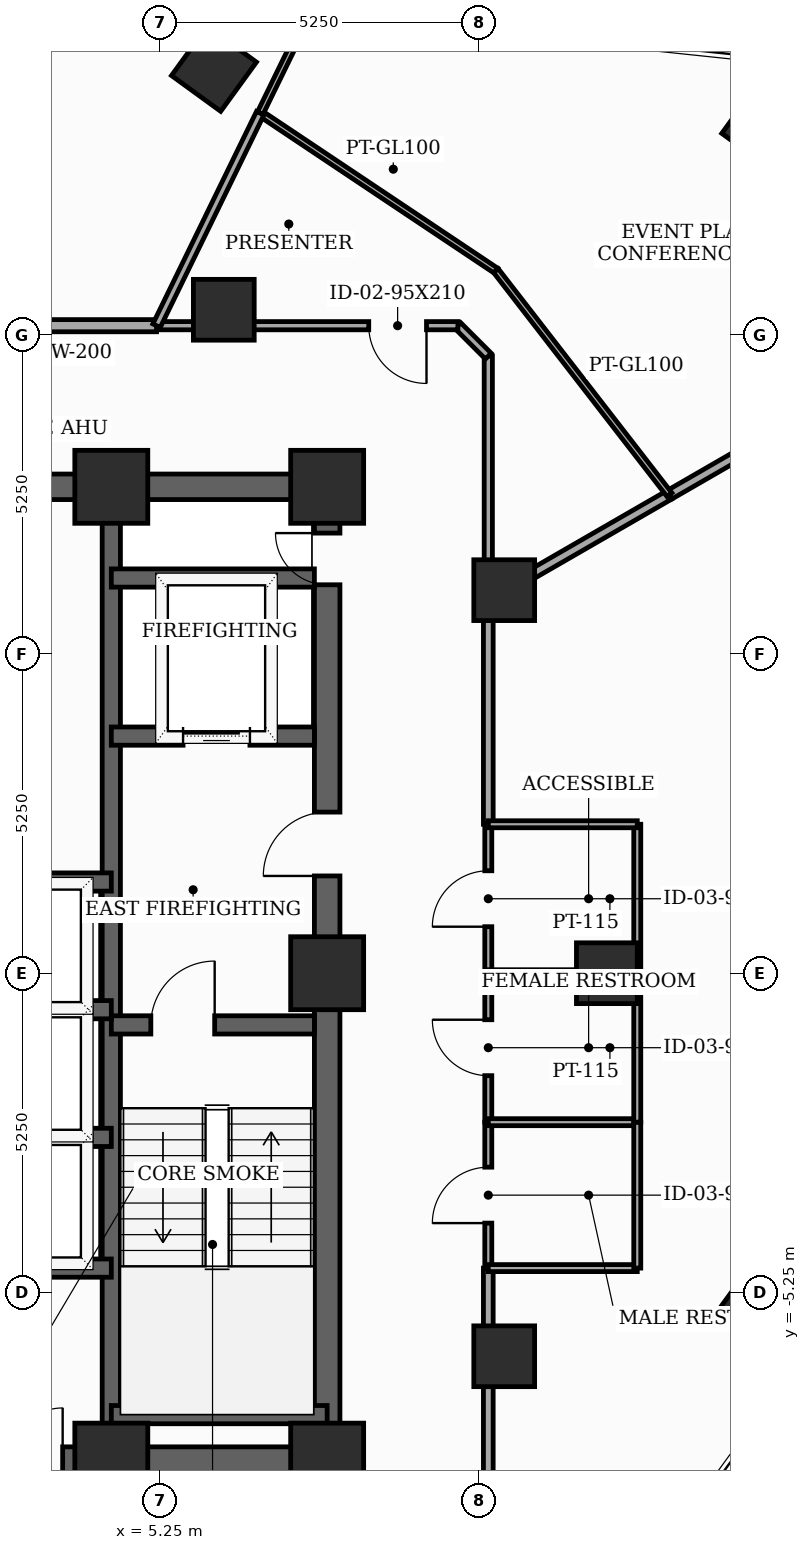
"""IFC4 building model, lengths in metres.
Left out: names, types, materials, properties, quantities, classifications, styles, units other than length and angle.
Written with IfcOpenShell. Run it as: python <this file> out.ifc"""

import sys

from ifc_helpers import new_model, si_unit, direction, frame, frame_2d, origin, origin_2d, place, context, subcontext, project, spatial, rectangle, extrude, element, fill, save


model = new_model("IFC4")
c1 = context("Model", 3, precision=1e-05, world=origin(), true_north=direction((0.0, 1.0)))
c2 = subcontext(c1, "Body", "Model", "MODEL_VIEW")
j1 = project(units=[si_unit("LENGTHUNIT", "METRE"), si_unit("PLANEANGLEUNIT", "RADIAN")], contexts=[c1])
p1 = place(None, origin())
s1 = spatial("IfcSite", under=j1, at=p1, CompositionType="ELEMENT")
p2 = place(p1, origin())
s2 = spatial("IfcBuilding", under=s1, at=p2, CompositionType="ELEMENT")
p3 = place(p2, frame((0.0, 0.0, 244.8)))
s3 = spatial("IfcBuildingStorey", under=s2, at=p3, CompositionType="ELEMENT", Elevation=244.8)
for number, where, z_axis, x_axis in (
    (1, (4.45, -8.0, 0.0), (0.0, 0.0, 1.0), (1.0, 0.0, 0.0)),
    (2, (8.0, -8.0, 0.0), (0.0, 0.0, 1.0), (1.0, 0.0, 0.0)),
    (3, (8.0, 0.0, 0.0), (0.0, 0.0, 1.0), (1.0, 0.0, 0.0)),
    (4, (8.0, 8.0, 0.0), (0.0, 0.0, 1.0), (1.0, 0.0, 0.0)),
    (5, (4.45, 8.0, 0.0), (0.0, 0.0, 1.0), (1.0, 0.0, 0.0)),
):
    element("IfcColumn", number, at=place(p3, frame(where, z_axis=z_axis, x_axis=x_axis)), inside=s3, PredefinedType="COLUMN", context=c2, shape_type="SweptSolid", body=[
        extrude(rectangle(XDim=1.2, YDim=1.2, at=origin_2d()), origin(), (0.0, 0.0, 1.0), 3.7),
    ])
for number, where, z_axis, x_axis in (
    (6, (12.6, 0.0, 0.0), (0.0, 0.0, 1.0), (1.0, 0.0, 0.0)),
    (7, (10.912, 6.3, 0.0), (0.0, 0.0, 1.0), (1.0, 0.0, 0.0)),
    (8, (6.3, 10.912, 0.0), (0.0, 0.0, 1.0), (1.0, 0.0, 0.0)),
    (9, (10.912, -6.3, 0.0), (0.0, 0.0, 1.0), (1.0, 0.0, 0.0)),
    (10, (15.161, -5.391, 0.0), (0.0, 0.0, 1.0), (0.588, 0.809, 0.0)),
    (11, (15.188, 13.923, 0.0), (0.0, 0.0, 1.0), (0.588, 0.809, 0.0)),
    (12, (6.138, 14.875, 0.0), (0.0, 0.0, 1.0), (0.588, 0.809, 0.0)),
):
    element("IfcColumn", number, at=place(p3, frame(where, z_axis=z_axis, x_axis=x_axis)), inside=s3, PredefinedType="COLUMN", context=c2, shape_type="SweptSolid", body=[
        extrude(rectangle(XDim=1.0, YDim=1.0, at=origin_2d()), origin(), (0.0, 0.0, 1.0), 3.7),
    ])
p4 = place(p3, frame((8.0, -8.0, 0.0), z_axis=(0.0, 0.0, 1.0), x_axis=(0.0, 1.0, 0.0)))
e13 = element("IfcWall", 13, at=p4, inside=s3, PredefinedType="SHEAR", context=c2, shape_type="SweptSolid", body=[
    extrude(rectangle(XDim=16.0, YDim=0.42, at=frame_2d((8.0, 0.0))), origin(), (0.0, 0.0, 1.0), 3.5),
])
p5 = place(p4, frame((9.6, 0.0, 0.0)))
e14 = element("IfcOpeningElement", 14, at=p5, cuts=e13, PredefinedType="OPENING", context=c2, shape_type="SweptSolid", body=[
    extrude(rectangle(XDim=1.05, YDim=2.15, at=frame_2d((0.525, 1.075))), frame((0.0, 0.22, 0.0), z_axis=(0.0, -1.0, 0.0), x_axis=(1.0, 0.0, 0.0)), (0.0, 0.0, 1.0), 0.44),
])
p6 = place(p4, frame((14.389, 0.0, 0.0)))
e15 = element("IfcOpeningElement", 15, at=p6, cuts=e13, PredefinedType="OPENING", context=c2, shape_type="SweptSolid", body=[
    extrude(rectangle(XDim=0.85, YDim=2.02, at=frame_2d((0.425, 1.01))), frame((0.0, 0.22, 0.0), z_axis=(0.0, -1.0, 0.0), x_axis=(1.0, 0.0, 0.0)), (0.0, 0.0, 1.0), 0.44),
])
p7 = place(p3, frame((-8.0, -8.0, 0.0), z_axis=(0.0, 0.0, 1.0), x_axis=(1.0, 0.0, 0.0)))
e16 = element("IfcWall", 16, at=p7, inside=s3, PredefinedType="SHEAR", context=c2, shape_type="SweptSolid", body=[
    extrude(rectangle(XDim=16.0, YDim=0.42, at=frame_2d((8.0, 0.0))), origin(), (0.0, 0.0, 1.0), 3.5),
])
p8 = place(p7, frame((4.35, 0.0, 0.0)))
e17 = element("IfcOpeningElement", 17, at=p8, cuts=e16, PredefinedType="OPENING", context=c2, shape_type="SweptSolid", body=[
    extrude(rectangle(XDim=0.85, YDim=2.02, at=frame_2d((0.425, 1.01))), frame((0.0, 0.22, 0.0), z_axis=(0.0, -1.0, 0.0), x_axis=(1.0, 0.0, 0.0)), (0.0, 0.0, 1.0), 0.44),
])
p9 = place(p7, frame((6.49, 0.0, 0.0)))
e18 = element("IfcOpeningElement", 18, at=p9, cuts=e16, PredefinedType="OPENING", context=c2, shape_type="SweptSolid", body=[
    extrude(rectangle(XDim=0.85, YDim=2.02, at=frame_2d((0.425, 1.01))), frame((0.0, 0.22, 0.0), z_axis=(0.0, -1.0, 0.0), x_axis=(1.0, 0.0, 0.0)), (0.0, 0.0, 1.0), 0.44),
])
p10 = place(p7, frame((8.69, 0.0, 0.0)))
e19 = element("IfcOpeningElement", 19, at=p10, cuts=e16, PredefinedType="OPENING", context=c2, shape_type="SweptSolid", body=[
    extrude(rectangle(XDim=0.85, YDim=2.02, at=frame_2d((0.425, 1.01))), frame((0.0, 0.22, 0.0), z_axis=(0.0, -1.0, 0.0), x_axis=(1.0, 0.0, 0.0)), (0.0, 0.0, 1.0), 0.44),
])
p11 = place(p7, frame((10.8, 0.0, 0.0)))
e20 = element("IfcOpeningElement", 20, at=p11, cuts=e16, PredefinedType="OPENING", context=c2, shape_type="SweptSolid", body=[
    extrude(rectangle(XDim=0.85, YDim=2.02, at=frame_2d((0.425, 1.01))), frame((0.0, 0.22, 0.0), z_axis=(0.0, -1.0, 0.0), x_axis=(1.0, 0.0, 0.0)), (0.0, 0.0, 1.0), 0.44),
])
p12 = place(p3, frame((-8.0, 8.0, 0.0), z_axis=(0.0, 0.0, 1.0), x_axis=(1.0, 0.0, 0.0)))
e21 = element("IfcWall", 21, at=p12, inside=s3, PredefinedType="SHEAR", context=c2, shape_type="SweptSolid", body=[
    extrude(rectangle(XDim=16.0, YDim=0.42, at=frame_2d((8.0, 0.0))), origin(), (0.0, 0.0, 1.0), 3.5),
])
p13 = place(p12, frame((7.1, 0.0, 0.0)))
e22 = element("IfcOpeningElement", 22, at=p13, cuts=e21, PredefinedType="OPENING", context=c2, shape_type="SweptSolid", body=[
    extrude(rectangle(XDim=1.8, YDim=2.15, at=frame_2d((0.9, 1.075))), frame((0.0, 0.22, 0.0), z_axis=(0.0, -1.0, 0.0), x_axis=(1.0, 0.0, 0.0)), (0.0, 0.0, 1.0), 0.44),
])
p14 = place(p3, frame((4.45, -7.79, 0.0), z_axis=(0.0, 0.0, 1.0), x_axis=(0.0, 1.0, 0.0)))
e23 = element("IfcWall", 23, at=p14, inside=s3, PredefinedType="SHEAR", context=c2, shape_type="SweptSolid", body=[
    extrude(rectangle(XDim=15.58, YDim=0.3, at=frame_2d((7.79, 0.0))), origin(), (0.0, 0.0, 1.0), 3.5),
])
p15 = place(p3, frame((4.45, -0.85, 0.0), z_axis=(0.0, 0.0, 1.0), x_axis=(1.0, 0.0, 0.0)))
e24 = element("IfcWall", 24, at=p15, inside=s3, PredefinedType="SHEAR", context=c2, shape_type="SweptSolid", body=[
    extrude(rectangle(XDim=3.34, YDim=0.3, at=frame_2d((1.67, 0.0))), origin(), (0.0, 0.0, 1.0), 3.5),
])
p16 = place(p15, frame((0.65, 0.0, 0.0)))
e25 = element("IfcOpeningElement", 25, at=p16, cuts=e24, PredefinedType="OPENING", context=c2, shape_type="SweptSolid", body=[
    extrude(rectangle(XDim=1.05, YDim=2.15, at=frame_2d((0.525, 1.075))), frame((0.0, 0.16, 0.0), z_axis=(0.0, -1.0, 0.0), x_axis=(1.0, 0.0, 0.0)), (0.0, 0.0, 1.0), 0.32),
])
p17 = place(p3, frame((4.45, -7.26, 0.0), z_axis=(0.0, 0.0, 1.0), x_axis=(1.0, 0.0, 0.0)))
e26 = element("IfcWall", 26, at=p17, inside=s3, PredefinedType="SHEAR", context=c2, shape_type="SweptSolid", body=[
    extrude(rectangle(XDim=3.55, YDim=0.3, at=frame_2d((1.775, 0.0))), origin(), (0.0, 0.0, 1.0), 3.5),
])
p18 = place(p3, frame((4.45, 3.9, 0.0), z_axis=(0.0, 0.0, 1.0), x_axis=(1.0, 0.0, 0.0)))
e27 = element("IfcWall", 27, at=p18, inside=s3, PredefinedType="SHEAR", context=c2, shape_type="SweptSolid", body=[
    extrude(rectangle(XDim=3.34, YDim=0.3, at=frame_2d((1.67, 0.0))), origin(), (0.0, 0.0, 1.0), 3.5),
])
p19 = place(p18, frame((1.18, 0.0, 0.0)))
e28 = element("IfcOpeningElement", 28, at=p19, cuts=e27, PredefinedType="OPENING", context=c2, shape_type="SweptSolid", body=[
    extrude(rectangle(XDim=1.1, YDim=2.1, at=frame_2d((0.55, 1.05))), frame((0.0, 0.16, 0.0), z_axis=(0.0, -1.0, 0.0), x_axis=(1.0, 0.0, 0.0)), (0.0, 0.0, 1.0), 0.32),
])
p20 = place(p3, frame((4.45, 6.5, 0.0), z_axis=(0.0, 0.0, 1.0), x_axis=(1.0, 0.0, 0.0)))
e29 = element("IfcWall", 29, at=p20, inside=s3, PredefinedType="SHEAR", context=c2, shape_type="SweptSolid", body=[
    extrude(rectangle(XDim=3.34, YDim=0.3, at=frame_2d((1.67, 0.0))), origin(), (0.0, 0.0, 1.0), 3.5),
])
p21 = place(p3, frame((-4.45, -4.85, 0.0), z_axis=(0.0, 0.0, 1.0), x_axis=(1.0, 0.0, 0.0)))
e30 = element("IfcWall", 30, at=p21, inside=s3, PredefinedType="SHEAR", context=c2, shape_type="SweptSolid", body=[
    extrude(rectangle(XDim=8.9, YDim=0.3, at=frame_2d((4.45, 0.0))), origin(), (0.0, 0.0, 1.0), 3.5),
])
for number, where, z_axis, x_axis in (
    (31, (1.68, 1.5, 0.0), (0.0, 0.0, 1.0), (1.0, 0.0, 0.0)),
    (32, (1.68, -2.7, 0.0), (0.0, 0.0, 1.0), (1.0, 0.0, 0.0)),
    (33, (1.68, -0.6, 0.0), (0.0, 0.0, 1.0), (1.0, 0.0, 0.0)),
):
    element("IfcWall", number, at=place(p3, frame(where, z_axis=z_axis, x_axis=x_axis)), inside=s3, PredefinedType="SHEAR", context=c2, shape_type="SweptSolid", body=[
        extrude(rectangle(XDim=2.77, YDim=0.3, at=frame_2d((1.385, 0.0))), origin(), (0.0, 0.0, 1.0), 3.5),
    ])
p22 = place(p3, frame((10.65, -4.85, 0.0), z_axis=(0.0, 0.0, 1.0), x_axis=(0.0, 1.0, 0.0)))
e34 = element("IfcWall", 34, at=p22, inside=s3, PredefinedType="PARTITIONING", context=c2, shape_type="SweptSolid", body=[
    extrude(rectangle(XDim=2.4, YDim=0.115, at=frame_2d((1.2, 0.0))), origin(), (0.0, 0.0, 1.0), 3.5),
])
p23 = place(p22, frame((0.74, 0.0, 0.0)))
e35 = element("IfcOpeningElement", 35, at=p23, cuts=e34, PredefinedType="OPENING", context=c2, shape_type="SweptSolid", body=[
    extrude(rectangle(XDim=0.92, YDim=2.1, at=frame_2d((0.46, 1.05))), frame((0.0, 0.067, 0.0), z_axis=(0.0, -1.0, 0.0), x_axis=(1.0, 0.0, 0.0)), (0.0, 0.0, 1.0), 0.135),
])
p24 = place(p3, frame((10.65, -2.45, 0.0), z_axis=(0.0, 0.0, 1.0), x_axis=(0.0, 1.0, 0.0)))
e36 = element("IfcWall", 36, at=p24, inside=s3, PredefinedType="PARTITIONING", context=c2, shape_type="SweptSolid", body=[
    extrude(rectangle(XDim=2.45, YDim=0.115, at=frame_2d((1.225, 0.0))), origin(), (0.0, 0.0, 1.0), 2.885),
])
p25 = place(p24, frame((0.765, 0.0, 0.0)))
e37 = element("IfcOpeningElement", 37, at=p25, cuts=e36, PredefinedType="OPENING", context=c2, shape_type="SweptSolid", body=[
    extrude(rectangle(XDim=0.92, YDim=2.1, at=frame_2d((0.46, 1.05))), frame((0.0, 0.067, 0.0), z_axis=(0.0, -1.0, 0.0), x_axis=(1.0, 0.0, 0.0)), (0.0, 0.0, 1.0), 0.135),
])
p26 = place(p3, frame((10.65, 0.0, 0.0), z_axis=(0.0, 0.0, 1.0), x_axis=(0.0, 1.0, 0.0)))
e38 = element("IfcWall", 38, at=p26, inside=s3, PredefinedType="PARTITIONING", context=c2, shape_type="SweptSolid", body=[
    extrude(rectangle(XDim=2.45, YDim=0.115, at=frame_2d((1.225, 0.0))), origin(), (0.0, 0.0, 1.0), 2.885),
])
p27 = place(p26, frame((0.765, 0.0, 0.0)))
e39 = element("IfcOpeningElement", 39, at=p27, cuts=e38, PredefinedType="OPENING", context=c2, shape_type="SweptSolid", body=[
    extrude(rectangle(XDim=0.92, YDim=2.1, at=frame_2d((0.46, 1.05))), frame((0.0, 0.067, 0.0), z_axis=(0.0, -1.0, 0.0), x_axis=(1.0, 0.0, 0.0)), (0.0, 0.0, 1.0), 0.135),
])
p28 = place(p3, frame((10.65, -10.15, 0.0), z_axis=(0.0, 0.0, 1.0), x_axis=(0.0, 1.0, 0.0)))
e40 = element("IfcWall", 40, at=p28, inside=s3, PredefinedType="PARTITIONING", context=c2, shape_type="SweptSolid", body=[
    extrude(rectangle(XDim=5.3, YDim=0.16, at=frame_2d((2.65, 0.0))), origin(), (0.0, 0.0, 1.0), 2.085),
])
p29 = place(p28, frame((0.56, 0.0, 0.0)))
e41 = element("IfcOpeningElement", 41, at=p29, cuts=e40, PredefinedType="OPENING", context=c2, shape_type="SweptSolid", body=[
    extrude(rectangle(XDim=1.0, YDim=2.035, at=frame_2d((0.5, 1.018))), frame((0.0, 0.09, 0.0), z_axis=(0.0, -1.0, 0.0), x_axis=(1.0, 0.0, 0.0)), (0.0, 0.0, 1.0), 0.18),
])
p30 = place(p3, frame((10.65, 2.45, 0.0), z_axis=(0.0, 0.0, 1.0), x_axis=(0.0, 1.0, 0.0)))
e42 = element("IfcWall", 42, at=p30, inside=s3, PredefinedType="PARTITIONING", context=c2, shape_type="SweptSolid", body=[
    extrude(rectangle(XDim=3.699, YDim=0.16, at=frame_2d((1.85, 0.0))), origin(), (0.0, 0.0, 1.0), 3.5),
])
p31 = place(p3, frame((10.65, 6.149, 0.0), z_axis=(0.0, 0.0, 1.0), x_axis=(0.0, 1.0, 0.0)))
e43 = element("IfcWall", 43, at=p31, inside=s3, PredefinedType="PARTITIONING", context=c2, shape_type="SweptSolid", body=[
    extrude(rectangle(XDim=4.001, YDim=0.135, at=frame_2d((2.0, 0.0))), origin(), (0.0, 0.0, 1.0), 2.085),
])
p32 = place(p3, frame((10.65, 10.15, 0.0), z_axis=(0.0, 0.0, 1.0), x_axis=(-0.707106781187, 0.707106781187, 0.0)))
e44 = element("IfcWall", 44, at=p32, inside=s3, PredefinedType="PARTITIONING", context=c2, shape_type="SweptSolid", body=[
    extrude(rectangle(XDim=0.707, YDim=0.135, at=frame_2d((0.354, 0.0))), origin(), (0.0, 0.0, 1.0), 3.5),
])
p33 = place(p3, frame((10.15, 10.65, 0.0), z_axis=(0.0, 0.0, 1.0), x_axis=(-1.0, 0.0, 0.0)))
e45 = element("IfcWall", 45, at=p33, inside=s3, PredefinedType="PARTITIONING", context=c2, shape_type="SweptSolid", body=[
    extrude(rectangle(XDim=4.956, YDim=0.135, at=frame_2d((2.478, 0.0))), origin(), (0.0, 0.0, 1.0), 2.885),
])
p34 = place(p33, frame((0.516, 0.0, 0.0)))
e46 = element("IfcOpeningElement", 46, at=p34, cuts=e45, PredefinedType="OPENING", context=c2, shape_type="SweptSolid", body=[
    extrude(rectangle(XDim=0.95, YDim=2.1, at=frame_2d((0.475, 1.05))), frame((0.0, 0.077, 0.0), z_axis=(0.0, -1.0, 0.0), x_axis=(1.0, 0.0, 0.0)), (0.0, 0.0, 1.0), 0.155),
])
p35 = place(p3, frame((5.194, 10.65, 0.0), z_axis=(0.0, 0.0, 1.0), x_axis=(-1.0, 0.0, 0.0)))
e47 = element("IfcWall", 47, at=p35, inside=s3, PredefinedType="SOLIDWALL", context=c2, shape_type="SweptSolid", body=[
    extrude(rectangle(XDim=6.344, YDim=0.2, at=frame_2d((3.172, 0.0))), origin(), (0.0, 0.0, 1.0), 2.885),
])
p36 = place(p35, frame((2.697, 0.0, 0.0)))
e48 = element("IfcOpeningElement", 48, at=p36, cuts=e47, PredefinedType="OPENING", context=c2, shape_type="SweptSolid", body=[
    extrude(rectangle(XDim=0.95, YDim=2.1, at=frame_2d((0.475, 1.05))), frame((0.0, 0.11, 0.0), z_axis=(0.0, -1.0, 0.0), x_axis=(1.0, 0.0, 0.0)), (0.0, 0.0, 1.0), 0.22),
])
for number, where, z_axis, x_axis in (
    (49, (13.1, -2.45, 0.0), (0.0, 0.0, 1.0), (-1.0, 0.0, 0.0)),
    (50, (10.65, -4.85, 0.0), (0.0, 0.0, 1.0), (1.0, 0.0, 0.0)),
):
    element("IfcWall", number, at=place(p3, frame(where, z_axis=z_axis, x_axis=x_axis)), inside=s3, PredefinedType="PARTITIONING", context=c2, shape_type="SweptSolid", body=[
        extrude(rectangle(XDim=2.45, YDim=0.115, at=frame_2d((1.225, 0.0))), origin(), (0.0, 0.0, 1.0), 2.885),
    ])
p37 = place(p3, frame((13.1, -4.85, 0.0), z_axis=(0.0, 0.0, 1.0), x_axis=(0.0, 1.0, 0.0)))
e51 = element("IfcWall", 51, at=p37, inside=s3, PredefinedType="PARTITIONING", context=c2, shape_type="SweptSolid", body=[
    extrude(rectangle(XDim=2.4, YDim=0.115, at=frame_2d((1.2, 0.0))), origin(), (0.0, 0.0, 1.0), 3.5),
])
p38 = place(p3, frame((13.1, 0.0, 0.0), z_axis=(0.0, 0.0, 1.0), x_axis=(-1.0, 0.0, 0.0)))
e52 = element("IfcWall", 52, at=p38, inside=s3, PredefinedType="PARTITIONING", context=c2, shape_type="SweptSolid", body=[
    extrude(rectangle(XDim=2.45, YDim=0.115, at=frame_2d((1.225, 0.0))), origin(), (0.0, 0.0, 1.0), 2.085),
])
for number, where, z_axis, x_axis in (
    (53, (13.1, -2.45, 0.0), (0.0, 0.0, 1.0), (0.0, 1.0, 0.0)),
    (54, (13.1, 0.0, 0.0), (0.0, 0.0, 1.0), (0.0, 1.0, 0.0)),
):
    element("IfcWall", number, at=place(p3, frame(where, z_axis=z_axis, x_axis=x_axis)), inside=s3, PredefinedType="PARTITIONING", context=c2, shape_type="SweptSolid", body=[
        extrude(rectangle(XDim=2.45, YDim=0.115, at=frame_2d((1.225, 0.0))), origin(), (0.0, 0.0, 1.0), 2.085),
    ])
p39 = place(p3, frame((13.1, 2.45, 0.0), z_axis=(0.0, 0.0, 1.0), x_axis=(-1.0, 0.0, 0.0)))
e55 = element("IfcWall", 55, at=p39, inside=s3, PredefinedType="PARTITIONING", context=c2, shape_type="SweptSolid", body=[
    extrude(rectangle(XDim=2.45, YDim=0.115, at=frame_2d((1.225, 0.0))), origin(), (0.0, 0.0, 1.0), 2.885),
])
p40 = place(p3, frame((24.432, 14.106, 0.0), z_axis=(0.0, 0.0, 1.0), x_axis=(-0.866010870421, -0.500025171679, 0.0)))
e56 = element("IfcWall", 56, at=p40, inside=s3, PredefinedType="PARTITIONING", context=c2, shape_type="SweptSolid", body=[
    extrude(rectangle(XDim=12.473, YDim=0.16, at=frame_2d((6.236, 0.0))), origin(), (0.0, 0.0, 1.0), 2.085),
])
p41 = place(p40, frame((5.776, 0.0, 0.0)))
e57 = element("IfcOpeningElement", 57, at=p41, cuts=e56, PredefinedType="OPENING", context=c2, shape_type="SweptSolid", body=[
    extrude(rectangle(XDim=0.92, YDim=2.035, at=frame_2d((0.46, 1.018))), frame((0.0, 0.09, 0.0), z_axis=(0.0, -1.0, 0.0), x_axis=(1.0, 0.0, 0.0)), (0.0, 0.0, 1.0), 0.18),
])
p42 = place(p3, frame((13.63, 7.869, 0.0), z_axis=(0.0, 0.0, 1.0), x_axis=(-0.866091067331, -0.499886250151, 0.0)))
e58 = element("IfcWall", 58, at=p42, inside=s3, PredefinedType="PARTITIONING", context=c2, shape_type="SweptSolid", body=[
    extrude(rectangle(XDim=3.441, YDim=0.16, at=frame_2d((1.72, 0.0))), origin(), (0.0, 0.0, 1.0), 2.085),
])
p43 = place(p3, frame((6.899, 14.145, 0.0), z_axis=(0.0, 0.0, 1.0), x_axis=(0.831510168033, -0.555509532283, 0.0)))
e59 = element("IfcWall", 59, at=p43, inside=s3, PredefinedType="MOVABLE", context=c2, shape_type="SweptSolid", body=[
    extrude(rectangle(XDim=4.663, YDim=0.1, at=frame_2d((2.331, 0.0))), origin(), (0.0, 0.0, 1.0), 3.5),
])
p44 = place(p3, frame((10.776, 11.555, 0.0), z_axis=(0.0, 0.0, 1.0), x_axis=(0.612213330569, -0.790692631731, 0.0)))
e60 = element("IfcWall", 60, at=p44, inside=s3, PredefinedType="MOVABLE", context=c2, shape_type="SweptSolid", body=[
    extrude(rectangle(XDim=4.662, YDim=0.1, at=frame_2d((2.331, 0.0))), origin(), (0.0, 0.0, 1.0), 2.085),
])
p45 = place(p3, frame((7.747, 15.882, 0.0), z_axis=(0.0, 0.0, 1.0), x_axis=(-0.438553034404, -0.898705310998, 0.0)))
e61 = element("IfcWall", 61, at=p45, inside=s3, PredefinedType="MOVABLE", context=c2, shape_type="SweptSolid", body=[
    extrude(rectangle(XDim=1.933, YDim=0.1, at=frame_2d((0.966, 0.0))), origin(), (0.0, 0.0, 1.0), 2.085),
])
p46 = place(p3, frame((6.899, 14.145, 0.0), z_axis=(0.0, 0.0, 1.0), x_axis=(-0.438402604201, -0.898778702813, 0.0)))
e62 = element("IfcWall", 62, at=p46, inside=s3, PredefinedType="PARTITIONING", context=c2, shape_type="SweptSolid", body=[
    extrude(rectangle(XDim=3.889, YDim=0.135, at=frame_2d((1.944, 0.0))), origin(), (0.0, 0.0, 1.0), 2.085),
])
p47 = place(p5, origin())
e63 = element("IfcDoor", 63, at=p47, inside=s3, OperationType="SINGLE_SWING_LEFT", PredefinedType="DOOR", context=c2, shape_type="SweptSolid", body=[
    extrude(rectangle(XDim=1.05, YDim=2.15, at=frame_2d((0.525, 1.075))), frame((0.0, 0.025, 0.0), z_axis=(0.0, -1.0, 0.0), x_axis=(1.0, 0.0, 0.0)), (0.0, 0.0, 1.0), 0.05),
])
fill(e14, e63)
p48 = place(p6, origin())
e64 = element("IfcDoor", 64, at=p48, inside=s3, OperationType="SINGLE_SWING_RIGHT", PredefinedType="TRAPDOOR", context=c2, shape_type="SweptSolid", body=[
    extrude(rectangle(XDim=0.85, YDim=2.02, at=frame_2d((0.425, 1.01))), frame((0.0, 0.025, 0.0), z_axis=(0.0, -1.0, 0.0), x_axis=(1.0, 0.0, 0.0)), (0.0, 0.0, 1.0), 0.05),
])
fill(e15, e64)
p49 = place(p11, origin())
e65 = element("IfcDoor", 65, at=p49, inside=s3, OperationType="SINGLE_SWING_RIGHT", PredefinedType="TRAPDOOR", context=c2, shape_type="SweptSolid", body=[
    extrude(rectangle(XDim=0.85, YDim=2.02, at=frame_2d((0.425, 1.01))), frame((0.0, 0.025, 0.0), z_axis=(0.0, -1.0, 0.0), x_axis=(1.0, 0.0, 0.0)), (0.0, 0.0, 1.0), 0.05),
])
fill(e20, e65)
p50 = place(p16, origin())
e66 = element("IfcDoor", 66, at=p50, inside=s3, OperationType="SINGLE_SWING_RIGHT", PredefinedType="DOOR", context=c2, shape_type="SweptSolid", body=[
    extrude(rectangle(XDim=1.05, YDim=2.15, at=frame_2d((0.525, 1.075))), frame((0.0, 0.025, 0.0), z_axis=(0.0, -1.0, 0.0), x_axis=(1.0, 0.0, 0.0)), (0.0, 0.0, 1.0), 0.05),
])
fill(e25, e66)
p51 = place(p19, origin())
e67 = element("IfcDoor", 67, at=p51, inside=s3, OperationType="SLIDING_TO_LEFT", PredefinedType="DOOR", context=c2, shape_type="SweptSolid", body=[
    extrude(rectangle(XDim=1.1, YDim=2.1, at=frame_2d((0.55, 1.05))), frame((0.0, 0.025, 0.0), z_axis=(0.0, -1.0, 0.0), x_axis=(1.0, 0.0, 0.0)), (0.0, 0.0, 1.0), 0.05),
])
fill(e28, e67)
p52 = place(p23, origin())
e68 = element("IfcDoor", 68, at=p52, inside=s3, OperationType="SINGLE_SWING_LEFT", PredefinedType="DOOR", context=c2, shape_type="SweptSolid", body=[
    extrude(rectangle(XDim=0.92, YDim=2.1, at=frame_2d((0.46, 1.05))), frame((0.0, 0.025, 0.0), z_axis=(0.0, -1.0, 0.0), x_axis=(1.0, 0.0, 0.0)), (0.0, 0.0, 1.0), 0.05),
])
fill(e35, e68)
p53 = place(p25, origin())
e69 = element("IfcDoor", 69, at=p53, inside=s3, OperationType="SINGLE_SWING_RIGHT", PredefinedType="DOOR", context=c2, shape_type="SweptSolid", body=[
    extrude(rectangle(XDim=0.92, YDim=2.1, at=frame_2d((0.46, 1.05))), frame((0.0, 0.025, 0.0), z_axis=(0.0, -1.0, 0.0), x_axis=(1.0, 0.0, 0.0)), (0.0, 0.0, 1.0), 0.05),
])
fill(e37, e69)
p54 = place(p27, origin())
e70 = element("IfcDoor", 70, at=p54, inside=s3, OperationType="SINGLE_SWING_LEFT", PredefinedType="DOOR", context=c2, shape_type="SweptSolid", body=[
    extrude(rectangle(XDim=0.92, YDim=2.1, at=frame_2d((0.46, 1.05))), frame((0.0, 0.025, 0.0), z_axis=(0.0, -1.0, 0.0), x_axis=(1.0, 0.0, 0.0)), (0.0, 0.0, 1.0), 0.05),
])
fill(e39, e70)
p55 = place(p34, origin())
e71 = element("IfcDoor", 71, at=p55, inside=s3, OperationType="SINGLE_SWING_LEFT", PredefinedType="DOOR", context=c2, shape_type="SweptSolid", body=[
    extrude(rectangle(XDim=0.95, YDim=2.1, at=frame_2d((0.475, 1.05))), frame((0.0, 0.025, 0.0), z_axis=(0.0, -1.0, 0.0), x_axis=(1.0, 0.0, 0.0)), (0.0, 0.0, 1.0), 0.05),
])
fill(e46, e71)
save(model, sys.argv[1])
